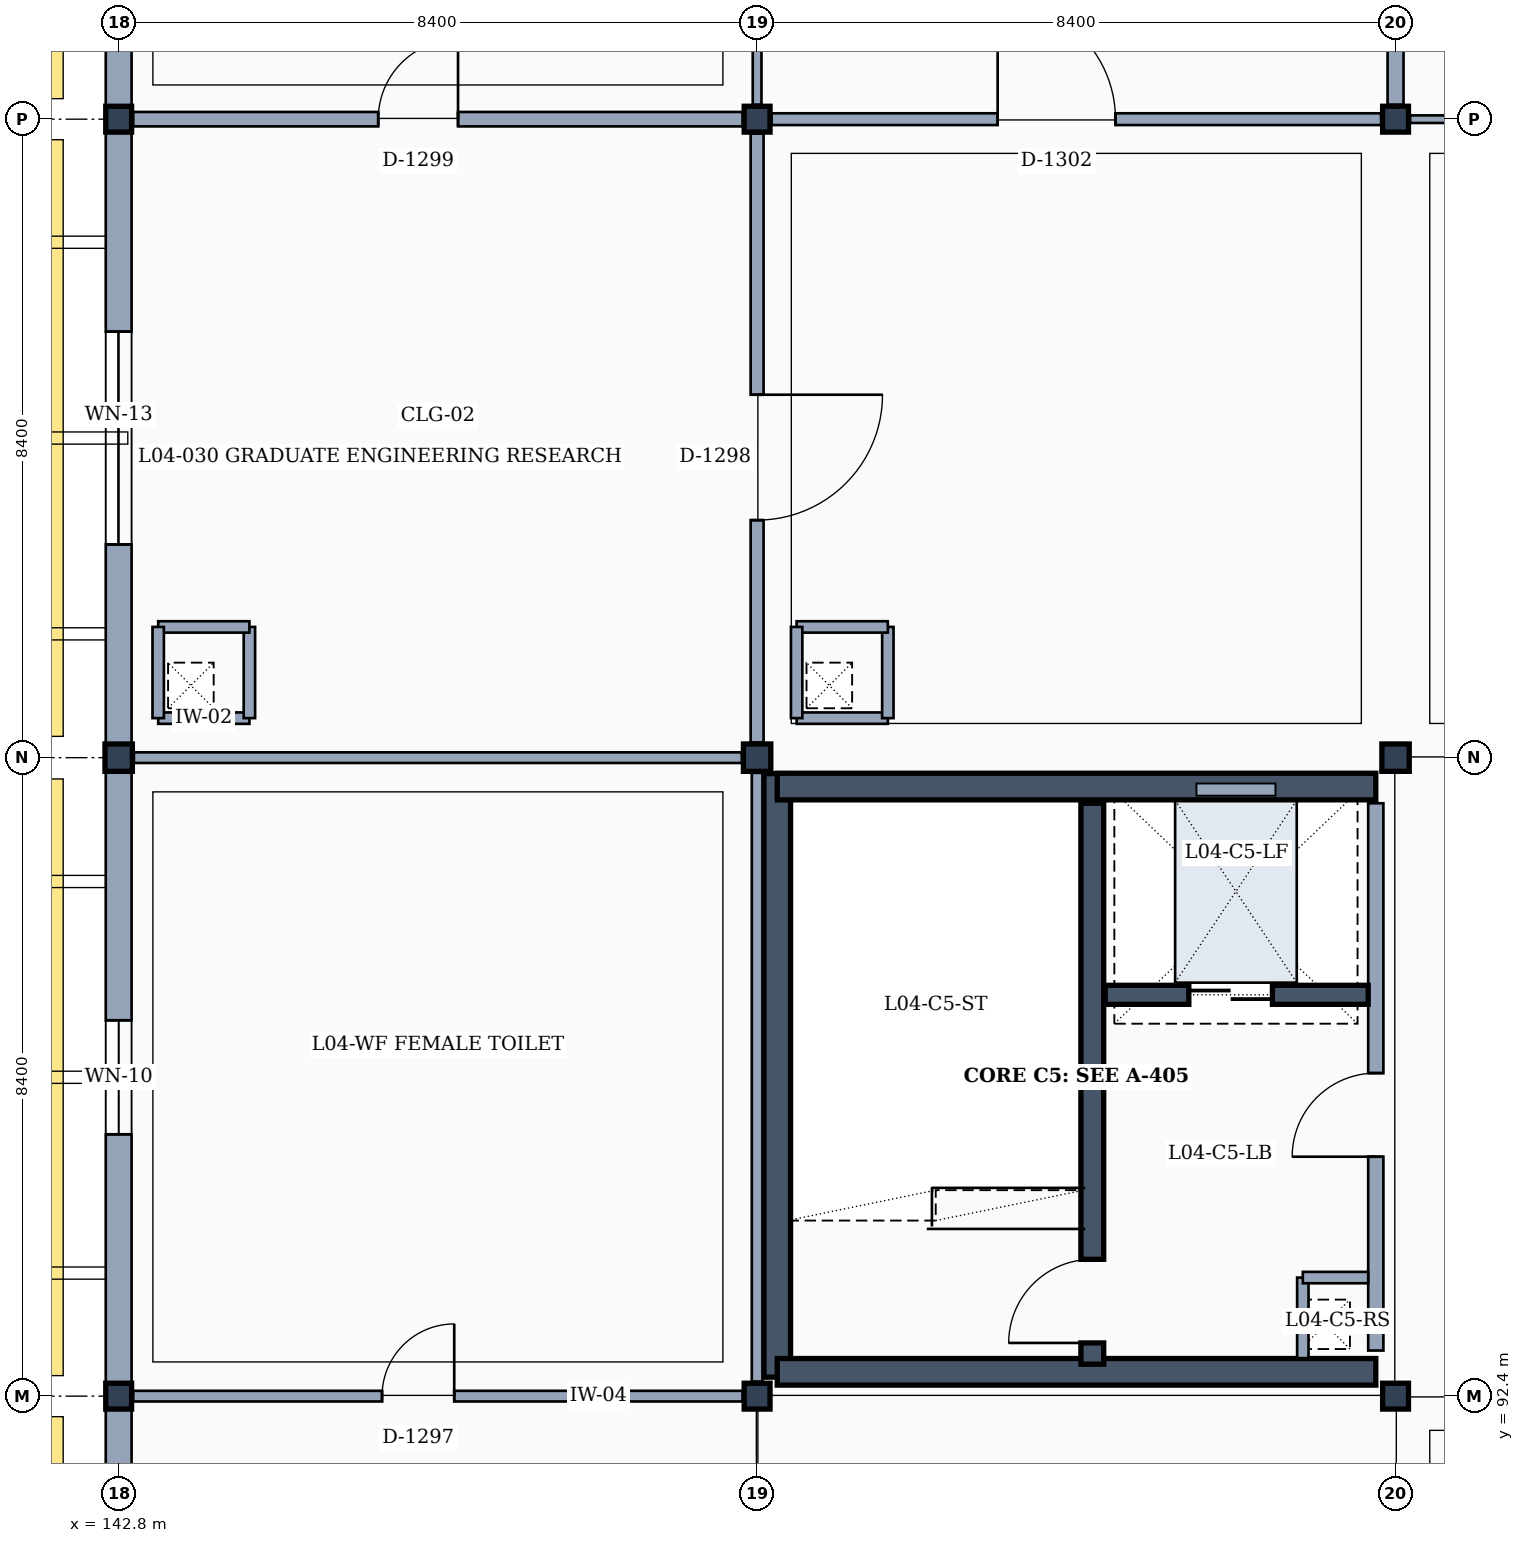
"""IFC4 building model, lengths in metres.
Left out: names, types, materials, properties, quantities, classifications, styles, units other than length and angle.
Written with IfcOpenShell. Run it as: python <this file> out.ifc"""

import sys

from ifc_helpers import new_model, si_unit, direction, frame, frame_2d, origin, origin_2d, place, context, subcontext, project, spatial, rectangle, extrude, element, fill, save


model = new_model("IFC4")
c1 = context("Model", 3, precision=1e-05, world=origin(), true_north=direction((0.0, 1.0)))
c2 = subcontext(c1, "Body", "Model", "MODEL_VIEW")
j1 = project(units=[si_unit("LENGTHUNIT", "METRE"), si_unit("PLANEANGLEUNIT", "RADIAN")], contexts=[c1])
p1 = place(None, origin())
s1 = spatial("IfcSite", under=j1, at=p1, CompositionType="ELEMENT")
p2 = place(p1, origin())
s2 = spatial("IfcBuilding", under=s1, at=p2, CompositionType="ELEMENT")
p3 = place(p2, frame((0.0, 0.0, 18.0)))
s3 = spatial("IfcBuildingStorey", under=s2, at=p3, CompositionType="ELEMENT", Elevation=18.0)
p4 = place(p3, frame((142.8, 92.4, 0.0), z_axis=(0.0, 0.0, 1.0), x_axis=(1.0, 0.0, 0.0)))
e1 = element("IfcColumn", 1, at=p4, inside=s3, PredefinedType="COLUMN", context=c2, shape_type="SweptSolid", body=[
    extrude(rectangle(XDim=0.34, YDim=0.34, at=origin_2d()), origin(), (0.0, 0.0, 1.0), 4.2),
])
p5 = place(p3, frame((142.8, 100.8, 0.0), z_axis=(0.0, 0.0, 1.0), x_axis=(1.0, 0.0, 0.0)))
e2 = element("IfcColumn", 2, at=p5, inside=s3, PredefinedType="COLUMN", context=c2, shape_type="SweptSolid", body=[
    extrude(rectangle(XDim=0.36, YDim=0.36, at=origin_2d()), origin(), (0.0, 0.0, 1.0), 4.2),
])
for number, where, z_axis, x_axis in (
    (3, (142.8, 109.2, 0.0), (0.0, 0.0, 1.0), (1.0, 0.0, 0.0)),
    (4, (151.2, 92.4, 0.0), (0.0, 0.0, 1.0), (1.0, 0.0, 0.0)),
):
    element("IfcColumn", number, at=place(p3, frame(where, z_axis=z_axis, x_axis=x_axis)), inside=s3, PredefinedType="COLUMN", context=c2, shape_type="SweptSolid", body=[
        extrude(rectangle(XDim=0.34, YDim=0.34, at=origin_2d()), origin(), (0.0, 0.0, 1.0), 4.2),
    ])
p6 = place(p3, frame((151.2, 100.8, 0.0), z_axis=(0.0, 0.0, 1.0), x_axis=(1.0, 0.0, 0.0)))
e5 = element("IfcColumn", 5, at=p6, inside=s3, PredefinedType="COLUMN", context=c2, shape_type="SweptSolid", body=[
    extrude(rectangle(XDim=0.36, YDim=0.36, at=origin_2d()), origin(), (0.0, 0.0, 1.0), 4.2),
])
for number, where, z_axis, x_axis in (
    (6, (151.2, 109.2, 0.0), (0.0, 0.0, 1.0), (1.0, 0.0, 0.0)),
    (7, (159.6, 92.4, 0.0), (0.0, 0.0, 1.0), (1.0, 0.0, 0.0)),
):
    element("IfcColumn", number, at=place(p3, frame(where, z_axis=z_axis, x_axis=x_axis)), inside=s3, PredefinedType="COLUMN", context=c2, shape_type="SweptSolid", body=[
        extrude(rectangle(XDim=0.34, YDim=0.34, at=origin_2d()), origin(), (0.0, 0.0, 1.0), 4.2),
    ])
p7 = place(p3, frame((159.6, 100.8, 0.0), z_axis=(0.0, 0.0, 1.0), x_axis=(1.0, 0.0, 0.0)))
e8 = element("IfcColumn", 8, at=p7, inside=s3, PredefinedType="COLUMN", context=c2, shape_type="SweptSolid", body=[
    extrude(rectangle(XDim=0.36, YDim=0.36, at=origin_2d()), origin(), (0.0, 0.0, 1.0), 4.2),
])
p8 = place(p3, frame((159.6, 109.2, 0.0), z_axis=(0.0, 0.0, 1.0), x_axis=(1.0, 0.0, 0.0)))
e9 = element("IfcColumn", 9, at=p8, inside=s3, PredefinedType="COLUMN", context=c2, shape_type="SweptSolid", body=[
    extrude(rectangle(XDim=0.34, YDim=0.34, at=origin_2d()), origin(), (0.0, 0.0, 1.0), 4.2),
])
p9 = place(p3, frame((142.8, 84.18, 0.0), z_axis=(0.0, 0.0, 1.0), x_axis=(0.0, 1.0, 0.0)))
e10 = element("IfcWall", 10, at=p9, inside=s3, PredefinedType="SOLIDWALL", context=c2, shape_type="SweptSolid", body=[
    extrude(rectangle(XDim=8.05, YDim=0.34, at=frame_2d((4.025, 0.0))), origin(), (0.0, 0.0, 1.0), 3.36),
])
p10 = place(p9, frame((2.975, 0.0, 0.9)))
e11 = element("IfcOpeningElement", 11, at=p10, cuts=e10, PredefinedType="OPENING", context=c2, shape_type="SweptSolid", body=[
    extrude(rectangle(XDim=2.1, YDim=1.6, at=frame_2d((1.05, 0.8))), frame((0.0, 0.18, 0.0), z_axis=(0.0, -1.0, 0.0), x_axis=(1.0, 0.0, 0.0)), (0.0, 0.0, 1.0), 0.36),
])
p11 = place(p3, frame((142.8, 92.57, 0.0), z_axis=(0.0, 0.0, 1.0), x_axis=(0.0, 1.0, 0.0)))
e12 = element("IfcWall", 12, at=p11, inside=s3, PredefinedType="SOLIDWALL", context=c2, shape_type="SweptSolid", body=[
    extrude(rectangle(XDim=8.05, YDim=0.34, at=frame_2d((4.025, 0.0))), origin(), (0.0, 0.0, 1.0), 3.36),
])
p12 = place(p11, frame((3.275, 0.0, 0.9)))
e13 = element("IfcOpeningElement", 13, at=p12, cuts=e12, PredefinedType="OPENING", context=c2, shape_type="SweptSolid", body=[
    extrude(rectangle(XDim=1.5, YDim=1.85, at=frame_2d((0.75, 0.925))), frame((0.0, 0.18, 0.0), z_axis=(0.0, -1.0, 0.0), x_axis=(1.0, 0.0, 0.0)), (0.0, 0.0, 1.0), 0.36),
])
p13 = place(p3, frame((142.8, 100.98, 0.0), z_axis=(0.0, 0.0, 1.0), x_axis=(0.0, 1.0, 0.0)))
e14 = element("IfcWall", 14, at=p13, inside=s3, PredefinedType="SOLIDWALL", context=c2, shape_type="SweptSolid", body=[
    extrude(rectangle(XDim=8.05, YDim=0.34, at=frame_2d((4.025, 0.0))), origin(), (0.0, 0.0, 1.0), 3.36),
])
p14 = place(p13, frame((2.625, 0.0, 0.9)))
e15 = element("IfcOpeningElement", 15, at=p14, cuts=e14, PredefinedType="OPENING", context=c2, shape_type="SweptSolid", body=[
    extrude(rectangle(XDim=2.8, YDim=1.65, at=frame_2d((1.4, 0.825))), frame((0.0, 0.18, 0.0), z_axis=(0.0, -1.0, 0.0), x_axis=(1.0, 0.0, 0.0)), (0.0, 0.0, 1.0), 0.36),
])
p15 = place(p3, frame((142.8, 109.37, 0.0), z_axis=(0.0, 0.0, 1.0), x_axis=(0.0, 1.0, 0.0)))
e16 = element("IfcWall", 16, at=p15, inside=s3, PredefinedType="SOLIDWALL", context=c2, shape_type="SweptSolid", body=[
    extrude(rectangle(XDim=8.05, YDim=0.34, at=frame_2d((4.025, 0.0))), origin(), (0.0, 0.0, 1.0), 3.36),
])
p16 = place(p15, frame((3.175, 0.0, 0.9)))
e17 = element("IfcOpeningElement", 17, at=p16, cuts=e16, PredefinedType="OPENING", context=c2, shape_type="SweptSolid", body=[
    extrude(rectangle(XDim=1.7, YDim=1.55, at=frame_2d((0.85, 0.775))), frame((0.0, 0.18, 0.0), z_axis=(0.0, -1.0, 0.0), x_axis=(1.0, 0.0, 0.0)), (0.0, 0.0, 1.0), 0.36),
])
p17 = place(p3, frame((151.465, 92.65, 0.0), z_axis=(0.0, 0.0, 1.0), x_axis=(0.0, 1.0, 0.0)))
e18 = element("IfcWall", 18, at=p17, inside=s3, PredefinedType="SHEAR", context=c2, shape_type="SweptSolid", body=[
    extrude(rectangle(XDim=7.94, YDim=0.35, at=frame_2d((3.97, 0.0))), origin(), (0.0, 0.0, 1.0), 3.98),
])
p18 = place(p3, frame((151.465, 100.42, 0.0), z_axis=(0.0, 0.0, 1.0), x_axis=(1.0, 0.0, 0.0)))
e19 = element("IfcWall", 19, at=p18, inside=s3, PredefinedType="SHEAR", context=c2, shape_type="SweptSolid", body=[
    extrude(rectangle(XDim=7.875, YDim=0.35, at=frame_2d((3.938, 0.0))), origin(), (0.0, 0.0, 1.0), 3.98),
])
p19 = place(p3, frame((159.34, 100.2, 0.0), z_axis=(0.0, 0.0, 1.0), x_axis=(0.0, -1.0, 0.0)))
e20 = element("IfcWall", 20, at=p19, inside=s3, PredefinedType="PARTITIONING", context=c2, shape_type="SweptSolid", body=[
    extrude(rectangle(XDim=7.2, YDim=0.2, at=frame_2d((3.6, 0.0))), origin(), (0.0, 0.0, 1.0), 3.32),
])
p20 = place(p19, frame((3.55, 0.0, 0.0)))
e21 = element("IfcOpeningElement", 21, at=p20, cuts=e20, PredefinedType="OPENING", context=c2, shape_type="SweptSolid", body=[
    extrude(rectangle(XDim=1.1, YDim=2.15, at=frame_2d((0.55, 1.075))), frame((0.0, 0.11, 0.0), z_axis=(0.0, -1.0, 0.0), x_axis=(1.0, 0.0, 0.0)), (0.0, 0.0, 1.0), 0.22),
])
p21 = place(p3, frame((159.34, 92.72, 0.0), z_axis=(0.0, 0.0, 1.0), x_axis=(-1.0, 0.0, 0.0)))
e22 = element("IfcWall", 22, at=p21, inside=s3, PredefinedType="SHEAR", context=c2, shape_type="SweptSolid", body=[
    extrude(rectangle(XDim=7.875, YDim=0.35, at=frame_2d((3.938, 0.0))), origin(), (0.0, 0.0, 1.0), 3.98),
])
p22 = place(p3, frame((155.61, 92.82, 0.0), z_axis=(0.0, 0.0, 1.0), x_axis=(0.0, 1.0, 0.0)))
e23 = element("IfcWall", 23, at=p22, inside=s3, PredefinedType="SHEAR", context=c2, shape_type="SweptSolid", body=[
    extrude(rectangle(XDim=7.38, YDim=0.3, at=frame_2d((3.69, 0.0))), origin(), (0.0, 0.0, 1.0), 3.98),
])
p23 = place(p22, frame((0.28, 0.0, 0.0)))
e24 = element("IfcOpeningElement", 24, at=p23, cuts=e23, PredefinedType="OPENING", context=c2, shape_type="SweptSolid", body=[
    extrude(rectangle(XDim=1.1, YDim=2.15, at=frame_2d((0.55, 1.075))), frame((0.0, 0.16, 0.0), z_axis=(0.0, -1.0, 0.0), x_axis=(1.0, 0.0, 0.0)), (0.0, 0.0, 1.0), 0.32),
])
p24 = place(p3, frame((158.38, 93.96, 0.0), z_axis=(0.0, 0.0, 1.0), x_axis=(0.0, -1.0, 0.0)))
e25 = element("IfcWall", 25, at=p24, inside=s3, PredefinedType="PARTITIONING", context=c2, shape_type="SweptSolid", body=[
    extrude(rectangle(XDim=1.06, YDim=0.15, at=frame_2d((0.53, 0.0))), origin(), (0.0, 0.0, 1.0), 3.32),
])
p25 = place(p3, frame((158.38, 93.96, 0.0), z_axis=(0.0, 0.0, 1.0), x_axis=(1.0, 0.0, 0.0)))
e26 = element("IfcWall", 26, at=p25, inside=s3, PredefinedType="PARTITIONING", context=c2, shape_type="SweptSolid", body=[
    extrude(rectangle(XDim=0.86, YDim=0.15, at=frame_2d((0.43, 0.0))), origin(), (0.0, 0.0, 1.0), 3.32),
])
p26 = place(p3, frame((155.78, 97.68, 0.0), z_axis=(0.0, 0.0, 1.0), x_axis=(1.0, 0.0, 0.0)))
e27 = element("IfcWall", 27, at=p26, inside=s3, PredefinedType="SHEAR", context=c2, shape_type="SweptSolid", body=[
    extrude(rectangle(XDim=3.46, YDim=0.25, at=frame_2d((1.73, 0.0))), origin(), (0.0, 0.0, 1.0), 3.98),
])
p27 = place(p26, frame((1.1, 0.0, 0.0)))
e28 = element("IfcOpeningElement", 28, at=p27, cuts=e27, PredefinedType="OPENING", context=c2, shape_type="SweptSolid", body=[
    extrude(rectangle(XDim=1.1, YDim=2.15, at=frame_2d((0.55, 1.075))), frame((0.0, 0.135, 0.0), z_axis=(0.0, -1.0, 0.0), x_axis=(1.0, 0.0, 0.0)), (0.0, 0.0, 1.0), 0.27),
])
for number, where, z_axis, x_axis in (
    (29, (143.32, 101.32, 0.0), (0.0, 0.0, 1.0), (1.0, 0.0, 0.0)),
    (30, (144.52, 101.32, 0.0), (0.0, 0.0, 1.0), (0.0, 1.0, 0.0)),
    (31, (144.52, 102.52, 0.0), (0.0, 0.0, 1.0), (-1.0, 0.0, 0.0)),
    (32, (143.32, 102.52, 0.0), (0.0, 0.0, 1.0), (0.0, -1.0, 0.0)),
    (33, (151.72, 101.32, 0.0), (0.0, 0.0, 1.0), (1.0, 0.0, 0.0)),
    (34, (152.92, 101.32, 0.0), (0.0, 0.0, 1.0), (0.0, 1.0, 0.0)),
    (35, (152.92, 102.52, 0.0), (0.0, 0.0, 1.0), (-1.0, 0.0, 0.0)),
    (36, (151.72, 102.52, 0.0), (0.0, 0.0, 1.0), (0.0, -1.0, 0.0)),
):
    element("IfcWall", number, at=place(p3, frame(where, z_axis=z_axis, x_axis=x_axis)), inside=s3, PredefinedType="PARTITIONING", context=c2, shape_type="SweptSolid", body=[
        extrude(rectangle(XDim=1.2, YDim=0.15, at=frame_2d((0.6, 0.0))), origin(), (0.0, 0.0, 1.0), 3.98),
    ])
p28 = place(p3, frame((142.99, 92.4, 0.0), z_axis=(0.0, 0.0, 1.0), x_axis=(1.0, 0.0, 0.0)))
e37 = element("IfcWall", 37, at=p28, inside=s3, PredefinedType="PARTITIONING", context=c2, shape_type="SweptSolid", body=[
    extrude(rectangle(XDim=8.02, YDim=0.14, at=frame_2d((4.01, 0.0))), origin(), (0.0, 0.0, 1.0), 3.32),
])
p29 = place(p28, frame((3.275, 0.0, 0.0)))
e38 = element("IfcOpeningElement", 38, at=p29, cuts=e37, PredefinedType="OPENING", context=c2, shape_type="SweptSolid", body=[
    extrude(rectangle(XDim=0.95, YDim=2.15, at=frame_2d((0.475, 1.075))), frame((0.0, 0.08, 0.0), z_axis=(0.0, -1.0, 0.0), x_axis=(1.0, 0.0, 0.0)), (0.0, 0.0, 1.0), 0.16),
])
p30 = place(p3, frame((151.2, 92.59, 0.0), z_axis=(0.0, 0.0, 1.0), x_axis=(0.0, 1.0, 0.0)))
e39 = element("IfcWall", 39, at=p30, inside=s3, PredefinedType="PARTITIONING", context=c2, shape_type="SweptSolid", body=[
    extrude(rectangle(XDim=8.01, YDim=0.14, at=frame_2d((4.005, 0.0))), origin(), (0.0, 0.0, 1.0), 3.32),
])
p31 = place(p3, frame((143.0, 100.8, 0.0), z_axis=(0.0, 0.0, 1.0), x_axis=(1.0, 0.0, 0.0)))
e40 = element("IfcWall", 40, at=p31, inside=s3, PredefinedType="PARTITIONING", context=c2, shape_type="SweptSolid", body=[
    extrude(rectangle(XDim=8.0, YDim=0.14, at=frame_2d((4.0, 0.0))), origin(), (0.0, 0.0, 1.0), 3.32),
])
p32 = place(p3, frame((151.2, 101.0, 0.0), z_axis=(0.0, 0.0, 1.0), x_axis=(0.0, 1.0, 0.0)))
e41 = element("IfcWall", 41, at=p32, inside=s3, PredefinedType="PARTITIONING", context=c2, shape_type="SweptSolid", body=[
    extrude(rectangle(XDim=8.01, YDim=0.17, at=frame_2d((4.005, 0.0))), origin(), (0.0, 0.0, 1.0), 3.32),
])
p33 = place(p32, frame((2.925, 0.0, 0.0)))
e42 = element("IfcOpeningElement", 42, at=p33, cuts=e41, PredefinedType="OPENING", context=c2, shape_type="SweptSolid", body=[
    extrude(rectangle(XDim=1.65, YDim=2.25, at=frame_2d((0.825, 1.125))), frame((0.0, 0.095, 0.0), z_axis=(0.0, -1.0, 0.0), x_axis=(1.0, 0.0, 0.0)), (0.0, 0.0, 1.0), 0.19),
])
p34 = place(p3, frame((142.99, 109.2, 0.0), z_axis=(0.0, 0.0, 1.0), x_axis=(1.0, 0.0, 0.0)))
e43 = element("IfcWall", 43, at=p34, inside=s3, PredefinedType="PARTITIONING", context=c2, shape_type="SweptSolid", body=[
    extrude(rectangle(XDim=8.02, YDim=0.19, at=frame_2d((4.01, 0.0))), origin(), (0.0, 0.0, 1.0), 3.32),
])
p35 = place(p34, frame((3.225, 0.0, 0.0)))
e44 = element("IfcOpeningElement", 44, at=p35, cuts=e43, PredefinedType="OPENING", context=c2, shape_type="SweptSolid", body=[
    extrude(rectangle(XDim=1.05, YDim=2.2, at=frame_2d((0.525, 1.1))), frame((0.0, 0.105, 0.0), z_axis=(0.0, -1.0, 0.0), x_axis=(1.0, 0.0, 0.0)), (0.0, 0.0, 1.0), 0.21),
])
p36 = place(p3, frame((151.2, 109.39, 0.0), z_axis=(0.0, 0.0, 1.0), x_axis=(0.0, 1.0, 0.0)))
e45 = element("IfcWall", 45, at=p36, inside=s3, PredefinedType="PARTITIONING", context=c2, shape_type="SweptSolid", body=[
    extrude(rectangle(XDim=8.01, YDim=0.115, at=frame_2d((4.005, 0.0))), origin(), (0.0, 0.0, 1.0), 3.32),
])
p37 = place(p3, frame((151.39, 109.2, 0.0), z_axis=(0.0, 0.0, 1.0), x_axis=(1.0, 0.0, 0.0)))
e46 = element("IfcWall", 46, at=p37, inside=s3, PredefinedType="PARTITIONING", context=c2, shape_type="SweptSolid", body=[
    extrude(rectangle(XDim=8.02, YDim=0.155, at=frame_2d((4.01, 0.0))), origin(), (0.0, 0.0, 1.0), 3.32),
])
p38 = place(p37, frame((2.975, 0.0, 0.0)))
e47 = element("IfcOpeningElement", 47, at=p38, cuts=e46, PredefinedType="OPENING", context=c2, shape_type="SweptSolid", body=[
    extrude(rectangle(XDim=1.55, YDim=2.35, at=frame_2d((0.775, 1.175))), frame((0.0, 0.087, 0.0), z_axis=(0.0, -1.0, 0.0), x_axis=(1.0, 0.0, 0.0)), (0.0, 0.0, 1.0), 0.175),
])
p39 = place(p3, frame((159.6, 109.39, 0.0), z_axis=(0.0, 0.0, 1.0), x_axis=(0.0, 1.0, 0.0)))
e48 = element("IfcWall", 48, at=p39, inside=s3, PredefinedType="PARTITIONING", context=c2, shape_type="SweptSolid", body=[
    extrude(rectangle(XDim=8.01, YDim=0.21, at=frame_2d((4.005, 0.0))), origin(), (0.0, 0.0, 1.0), 3.32),
])
p40 = place(p3, frame((159.79, 109.2, 0.0), z_axis=(0.0, 0.0, 1.0), x_axis=(1.0, 0.0, 0.0)))
e49 = element("IfcWall", 49, at=p40, inside=s3, PredefinedType="MOVABLE", context=c2, shape_type="SweptSolid", body=[
    extrude(rectangle(XDim=8.02, YDim=0.1, at=frame_2d((4.01, 0.0))), origin(), (0.0, 0.0, 1.0), 3.32),
])
p41 = place(p40, frame((3.025, 0.0, 0.0)))
e50 = element("IfcOpeningElement", 50, at=p41, cuts=e49, PredefinedType="OPENING", context=c2, shape_type="SweptSolid", body=[
    extrude(rectangle(XDim=1.45, YDim=2.35, at=frame_2d((0.725, 1.175))), frame((0.0, 0.06, 0.0), z_axis=(0.0, -1.0, 0.0), x_axis=(1.0, 0.0, 0.0)), (0.0, 0.0, 1.0), 0.12),
])
p42 = place(p12, origin())
e51 = element("IfcWindow", 51, at=p42, inside=s3, PartitioningType="SINGLE_PANEL", PredefinedType="WINDOW", context=c2, shape_type="SweptSolid", body=[
    extrude(rectangle(XDim=1.5, YDim=1.85, at=frame_2d((0.75, 0.925))), frame((0.0, 0.03, 0.0), z_axis=(0.0, -1.0, 0.0), x_axis=(1.0, 0.0, 0.0)), (0.0, 0.0, 1.0), 0.06),
])
fill(e13, e51)
p43 = place(p14, origin())
e52 = element("IfcWindow", 52, at=p43, inside=s3, PartitioningType="SINGLE_PANEL", PredefinedType="WINDOW", context=c2, shape_type="SweptSolid", body=[
    extrude(rectangle(XDim=2.8, YDim=1.65, at=frame_2d((1.4, 0.825))), frame((0.0, 0.03, 0.0), z_axis=(0.0, -1.0, 0.0), x_axis=(1.0, 0.0, 0.0)), (0.0, 0.0, 1.0), 0.06),
])
fill(e15, e52)
p44 = place(p20, frame((1.1, 0.0, 0.0), z_axis=(0.0, 0.0, 1.0), x_axis=(-1.0, 0.0, 0.0)))
e53 = element("IfcDoor", 53, at=p44, inside=s3, OperationType="SINGLE_SWING_LEFT", PredefinedType="DOOR", context=c2, shape_type="SweptSolid", body=[
    extrude(rectangle(XDim=1.1, YDim=2.15, at=frame_2d((0.55, 1.075))), frame((0.0, 0.025, 0.0), z_axis=(0.0, -1.0, 0.0), x_axis=(1.0, 0.0, 0.0)), (0.0, 0.0, 1.0), 0.05),
])
fill(e21, e53)
p45 = place(p23, origin())
e54 = element("IfcDoor", 54, at=p45, inside=s3, OperationType="SINGLE_SWING_LEFT", PredefinedType="DOOR", context=c2, shape_type="SweptSolid", body=[
    extrude(rectangle(XDim=1.1, YDim=2.15, at=frame_2d((0.55, 1.075))), frame((0.0, 0.025, 0.0), z_axis=(0.0, -1.0, 0.0), x_axis=(1.0, 0.0, 0.0)), (0.0, 0.0, 1.0), 0.05),
])
fill(e24, e54)
p46 = place(p27, origin())
e55 = element("IfcDoor", 55, at=p46, inside=s3, OperationType="DOUBLE_DOOR_SLIDING", PredefinedType="DOOR", context=c2, shape_type="SweptSolid", body=[
    extrude(rectangle(XDim=1.1, YDim=2.15, at=frame_2d((0.55, 1.075))), frame((0.0, 0.025, 0.0), z_axis=(0.0, -1.0, 0.0), x_axis=(1.0, 0.0, 0.0)), (0.0, 0.0, 1.0), 0.05),
])
fill(e28, e55)
p47 = place(p29, origin())
e56 = element("IfcDoor", 56, at=p47, inside=s3, OperationType="SINGLE_SWING_RIGHT", PredefinedType="DOOR", context=c2, shape_type="SweptSolid", body=[
    extrude(rectangle(XDim=0.95, YDim=2.15, at=frame_2d((0.475, 1.075))), frame((0.0, 0.025, 0.0), z_axis=(0.0, -1.0, 0.0), x_axis=(1.0, 0.0, 0.0)), (0.0, 0.0, 1.0), 0.05),
])
fill(e38, e56)
p48 = place(p33, frame((1.65, 0.0, 0.0), z_axis=(0.0, 0.0, 1.0), x_axis=(-1.0, 0.0, 0.0)))
e57 = element("IfcDoor", 57, at=p48, inside=s3, OperationType="SINGLE_SWING_LEFT", PredefinedType="DOOR", context=c2, shape_type="SweptSolid", body=[
    extrude(rectangle(XDim=1.65, YDim=2.25, at=frame_2d((0.825, 1.125))), frame((0.0, 0.025, 0.0), z_axis=(0.0, -1.0, 0.0), x_axis=(1.0, 0.0, 0.0)), (0.0, 0.0, 1.0), 0.05),
])
fill(e42, e57)
p49 = place(p35, origin())
e58 = element("IfcDoor", 58, at=p49, inside=s3, OperationType="SINGLE_SWING_RIGHT", PredefinedType="DOOR", context=c2, shape_type="SweptSolid", body=[
    extrude(rectangle(XDim=1.05, YDim=2.2, at=frame_2d((0.525, 1.1))), frame((0.0, 0.025, 0.0), z_axis=(0.0, -1.0, 0.0), x_axis=(1.0, 0.0, 0.0)), (0.0, 0.0, 1.0), 0.05),
])
fill(e44, e58)
p50 = place(p38, origin())
e59 = element("IfcDoor", 59, at=p50, inside=s3, OperationType="SINGLE_SWING_LEFT", PredefinedType="DOOR", context=c2, shape_type="SweptSolid", body=[
    extrude(rectangle(XDim=1.55, YDim=2.35, at=frame_2d((0.775, 1.175))), frame((0.0, 0.025, 0.0), z_axis=(0.0, -1.0, 0.0), x_axis=(1.0, 0.0, 0.0)), (0.0, 0.0, 1.0), 0.05),
])
fill(e47, e59)
save(model, sys.argv[1])
